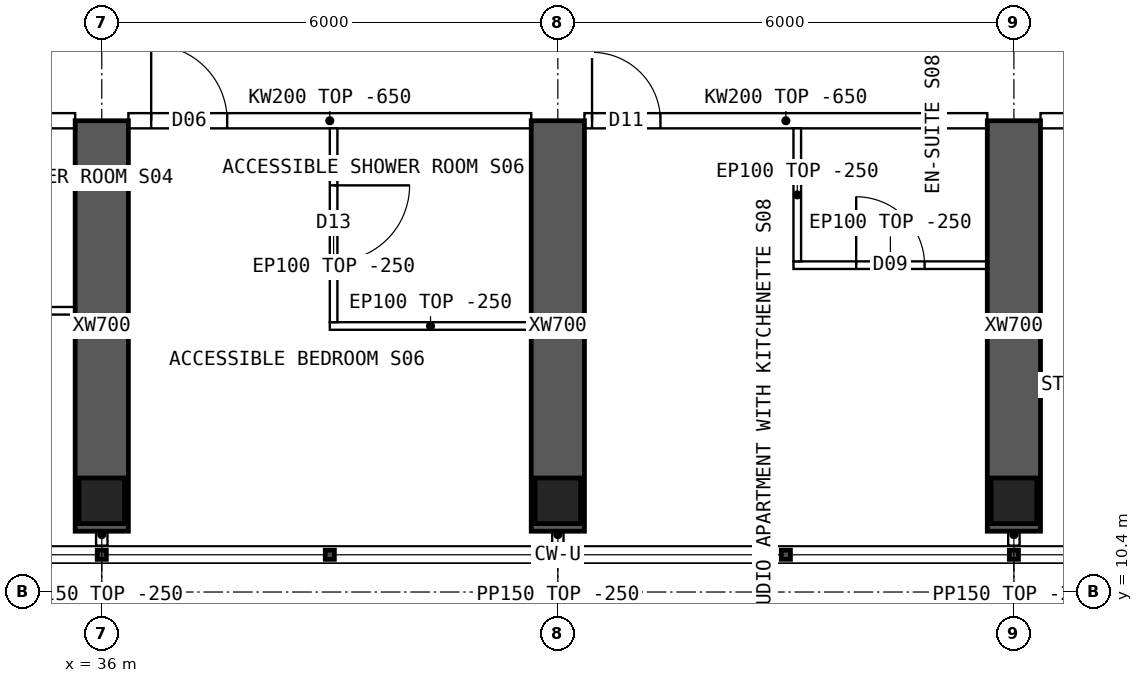
"""IFC4 building model, lengths in metres.
Left out: names, types, materials, properties, quantities, classifications, styles, units other than length and angle.
Written with IfcOpenShell. Run it as: python <this file> out.ifc"""

import sys

from ifc_helpers import new_model, si_unit, direction, frame, frame_2d, origin, origin_2d, place, context, subcontext, project, spatial, polyline, rectangle, hollow_rectangle, outline, extrude, element, fill, save


model = new_model("IFC4")
c1 = context("Model", 3, precision=1e-05, world=origin(), true_north=direction((0.0, 1.0)))
c2 = subcontext(c1, "Body", "Model", "MODEL_VIEW")
j1 = project(units=[si_unit("LENGTHUNIT", "METRE"), si_unit("PLANEANGLEUNIT", "RADIAN")], contexts=[c1])
p1 = place(None, origin())
s1 = spatial("IfcSite", under=j1, at=p1, CompositionType="ELEMENT")
p2 = place(p1, origin())
s2 = spatial("IfcBuilding", under=s1, at=p2, CompositionType="ELEMENT")
p3 = place(p2, frame((0.0, 0.0, 250.3)))
s3 = spatial("IfcBuildingStorey", under=s2, at=p3, CompositionType="ELEMENT", Elevation=250.3)
for number, where, z_axis, x_axis in (
    (1, (36.0, 11.6, 0.0), (0.0, 0.0, 1.0), (1.0, 0.0, 0.0)),
    (2, (42.0, 11.6, 0.0), (0.0, 0.0, 1.0), (1.0, 0.0, 0.0)),
    (3, (48.0, 11.6, 0.0), (0.0, 0.0, 1.0), (1.0, 0.0, 0.0)),
):
    element("IfcColumn", number, at=place(p3, frame(where, z_axis=z_axis, x_axis=x_axis)), inside=s3, PredefinedType="COLUMN", context=c2, shape_type="SweptSolid", body=[
        extrude(hollow_rectangle(XDim=0.6, YDim=0.6, WallThickness=0.06, at=origin_2d()), origin(), (0.0, 0.0, 1.0), 3.75),
    ])
for number, where, z_axis, x_axis in (
    (4, (36.0, 11.2, 0.0), (0.0, 0.0, 1.0), (0.0, 1.0, 0.0)),
    (5, (42.0, 11.2, 0.0), (0.0, 0.0, 1.0), (0.0, 1.0, 0.0)),
    (6, (48.0, 11.2, 0.0), (0.0, 0.0, 1.0), (0.0, 1.0, 0.0)),
):
    element("IfcWall", number, at=place(p3, frame(where, z_axis=z_axis, x_axis=x_axis)), inside=s3, PredefinedType="SHEAR", context=c2, shape_type="SweptSolid", body=[
        extrude(rectangle(XDim=5.4, YDim=0.7, at=frame_2d((2.7, 0.0))), origin(), (0.0, 0.0, 1.0), 3.75),
    ])
p4 = place(p3, frame((30.35, 16.6, 0.0), z_axis=(0.0, 0.0, 1.0), x_axis=(1.0, 0.0, 0.0)))
e7 = element("IfcWall", 7, at=p4, inside=s3, PredefinedType="SOLIDWALL", context=c2, shape_type="SweptSolid", body=[
    extrude(outline(polyline([(0.0, 0.0), (5.3, 0.0), (5.3, 3.1), (0.0, 3.1), (0.0, 0.0)])), frame((0.0, 0.1, 0.0), z_axis=(0.0, -1.0, 0.0), x_axis=(1.0, 0.0, 0.0)), (0.0, 0.0, 1.0), 0.2),
])
p5 = place(p4, frame((2.3, 0.0, 0.0)))
e8 = element("IfcOpeningElement", 8, at=p5, cuts=e7, PredefinedType="OPENING", context=c2, shape_type="SweptSolid", body=[
    extrude(rectangle(XDim=0.9, YDim=2.1, at=frame_2d((0.45, 1.05))), frame((0.0, 0.11, 0.0), z_axis=(0.0, -1.0, 0.0), x_axis=(1.0, 0.0, 0.0)), (0.0, 0.0, 1.0), 0.22),
])
p6 = place(p3, frame((36.35, 16.6, 0.0), z_axis=(0.0, 0.0, 1.0), x_axis=(1.0, 0.0, 0.0)))
e9 = element("IfcWall", 9, at=p6, inside=s3, PredefinedType="SOLIDWALL", context=c2, shape_type="SweptSolid", body=[
    extrude(outline(polyline([(0.0, 0.0), (5.3, 0.0), (5.3, 3.1), (0.0, 3.1), (0.0, 0.0)])), frame((0.0, 0.1, 0.0), z_axis=(0.0, -1.0, 0.0), x_axis=(1.0, 0.0, 0.0)), (0.0, 0.0, 1.0), 0.2),
])
p7 = place(p6, frame((0.3, 0.0, 0.0)))
e10 = element("IfcOpeningElement", 10, at=p7, cuts=e9, PredefinedType="OPENING", context=c2, shape_type="SweptSolid", body=[
    extrude(rectangle(XDim=1.0, YDim=2.1, at=frame_2d((0.5, 1.05))), frame((0.0, 0.11, 0.0), z_axis=(0.0, -1.0, 0.0), x_axis=(1.0, 0.0, 0.0)), (0.0, 0.0, 1.0), 0.22),
])
p8 = place(p3, frame((42.35, 16.6, 0.0), z_axis=(0.0, 0.0, 1.0), x_axis=(1.0, 0.0, 0.0)))
e11 = element("IfcWall", 11, at=p8, inside=s3, PredefinedType="SOLIDWALL", context=c2, shape_type="SweptSolid", body=[
    extrude(outline(polyline([(0.0, 0.0), (5.3, 0.0), (5.3, 3.1), (0.0, 3.1), (0.0, 0.0)])), frame((0.0, 0.1, 0.0), z_axis=(0.0, -1.0, 0.0), x_axis=(1.0, 0.0, 0.0)), (0.0, 0.0, 1.0), 0.2),
])
p9 = place(p8, frame((0.1, 0.0, 0.0)))
e12 = element("IfcOpeningElement", 12, at=p9, cuts=e11, PredefinedType="OPENING", context=c2, shape_type="SweptSolid", body=[
    extrude(rectangle(XDim=0.9, YDim=2.1, at=frame_2d((0.45, 1.05))), frame((0.0, 0.11, 0.0), z_axis=(0.0, -1.0, 0.0), x_axis=(1.0, 0.0, 0.0)), (0.0, 0.0, 1.0), 0.22),
])
p10 = place(p3, frame((48.35, 16.6, 0.0), z_axis=(0.0, 0.0, 1.0), x_axis=(1.0, 0.0, 0.0)))
e13 = element("IfcWall", 13, at=p10, inside=s3, PredefinedType="SOLIDWALL", context=c2, shape_type="SweptSolid", body=[
    extrude(outline(polyline([(0.0, 0.0), (5.3, 0.0), (5.3, 3.1), (0.0, 3.1), (0.0, 0.0)])), frame((0.0, 0.1, 0.0), z_axis=(0.0, -1.0, 0.0), x_axis=(1.0, 0.0, 0.0)), (0.0, 0.0, 1.0), 0.2),
])
p11 = place(p10, frame((2.3, 0.0, 0.0)))
e14 = element("IfcOpeningElement", 14, at=p11, cuts=e13, PredefinedType="OPENING", context=c2, shape_type="SweptSolid", body=[
    extrude(rectangle(XDim=0.9, YDim=2.1, at=frame_2d((0.45, 1.05))), frame((0.0, 0.11, 0.0), z_axis=(0.0, -1.0, 0.0), x_axis=(1.0, 0.0, 0.0)), (0.0, 0.0, 1.0), 0.22),
])
p12 = place(p3, frame((35.65, 14.1, 0.0), z_axis=(0.0, 0.0, 1.0), x_axis=(-1.0, 0.0, 0.0)))
e15 = element("IfcWall", 15, at=p12, inside=s3, PredefinedType="PARTITIONING", context=c2, shape_type="SweptSolid", body=[
    extrude(rectangle(XDim=3.15, YDim=0.1, at=frame_2d((1.575, 0.0))), origin(), (0.0, 0.0, 1.0), 3.5),
])
p13 = place(p12, frame((2.1, 0.0, 0.0)))
e16 = element("IfcOpeningElement", 16, at=p13, cuts=e15, PredefinedType="OPENING", context=c2, shape_type="SweptSolid", body=[
    extrude(rectangle(XDim=0.8, YDim=2.1, at=frame_2d((0.4, 1.05))), frame((0.0, 0.06, 0.0), z_axis=(0.0, -1.0, 0.0), x_axis=(1.0, 0.0, 0.0)), (0.0, 0.0, 1.0), 0.12),
])
p14 = place(p3, frame((39.0, 13.9, 0.0), z_axis=(0.0, 0.0, 1.0), x_axis=(1.0, 0.0, 0.0)))
e17 = element("IfcWall", 17, at=p14, inside=s3, PredefinedType="PARTITIONING", context=c2, shape_type="SweptSolid", body=[
    extrude(rectangle(XDim=2.65, YDim=0.1, at=frame_2d((1.325, 0.0))), origin(), (0.0, 0.0, 1.0), 3.5),
])
p15 = place(p3, frame((39.05, 13.95, 0.0), z_axis=(0.0, 0.0, 1.0), x_axis=(0.0, 1.0, 0.0)))
e18 = element("IfcWall", 18, at=p15, inside=s3, PredefinedType="PARTITIONING", context=c2, shape_type="SweptSolid", body=[
    extrude(outline(polyline([(0.0, 0.0), (2.55, 0.0), (2.55, 3.1), (2.502, 3.1), (2.5, 3.5), (0.0, 3.5), (0.0, 0.0)])), frame((0.0, 0.05, 0.0), z_axis=(0.0, -1.0, 0.0), x_axis=(1.0, 0.0, 0.0)), (0.0, 0.0, 1.0), 0.1),
])
p16 = place(p15, frame((0.8, 0.0, 0.0)))
e19 = element("IfcOpeningElement", 19, at=p16, cuts=e18, PredefinedType="OPENING", context=c2, shape_type="SweptSolid", body=[
    extrude(rectangle(XDim=1.0, YDim=2.1, at=frame_2d((0.5, 1.05))), frame((0.0, 0.06, 0.0), z_axis=(0.0, -1.0, 0.0), x_axis=(1.0, 0.0, 0.0)), (0.0, 0.0, 1.0), 0.12),
])
p17 = place(p3, frame((47.65, 14.7, 0.0), z_axis=(0.0, 0.0, 1.0), x_axis=(-1.0, 0.0, 0.0)))
e20 = element("IfcWall", 20, at=p17, inside=s3, PredefinedType="PARTITIONING", context=c2, shape_type="SweptSolid", body=[
    extrude(rectangle(XDim=2.55, YDim=0.1, at=frame_2d((1.275, 0.0))), origin(), (0.0, 0.0, 1.0), 3.5),
])
p18 = place(p17, frame((0.825, 0.0, 0.0)))
e21 = element("IfcOpeningElement", 21, at=p18, cuts=e20, PredefinedType="OPENING", context=c2, shape_type="SweptSolid", body=[
    extrude(rectangle(XDim=0.9, YDim=2.1, at=frame_2d((0.45, 1.05))), frame((0.0, 0.06, 0.0), z_axis=(0.0, -1.0, 0.0), x_axis=(1.0, 0.0, 0.0)), (0.0, 0.0, 1.0), 0.12),
])
p19 = place(p3, frame((45.15, 14.75, 0.0), z_axis=(0.0, 0.0, 1.0), x_axis=(0.0, 1.0, 0.0)))
e22 = element("IfcWall", 22, at=p19, inside=s3, PredefinedType="PARTITIONING", context=c2, shape_type="SweptSolid", body=[
    extrude(outline(polyline([(0.0, 0.0), (1.75, 0.0), (1.75, 3.1), (1.702, 3.1), (1.7, 3.5), (0.0, 3.5), (0.0, 0.0)])), frame((0.0, 0.05, 0.0), z_axis=(0.0, -1.0, 0.0), x_axis=(1.0, 0.0, 0.0)), (0.0, 0.0, 1.0), 0.1),
])
for number, where, z_axis, x_axis in (
    (23, (36.0, 11.3, 0.0), (0.0, 0.0, 1.0), (0.0, -1.0, 0.0)),
    (24, (42.0, 11.3, 0.0), (0.0, 0.0, 1.0), (0.0, -1.0, 0.0)),
    (25, (48.0, 11.3, 0.0), (0.0, 0.0, 1.0), (0.0, -1.0, 0.0)),
):
    element("IfcWall", number, at=place(p3, frame(where, z_axis=z_axis, x_axis=x_axis)), inside=s3, PredefinedType="PARTITIONING", context=c2, shape_type="SweptSolid", body=[
        extrude(rectangle(XDim=0.29, YDim=0.15, at=frame_2d((0.145, 0.0))), origin(), (0.0, 0.0, 1.0), 3.5),
    ])
p20 = place(p16, origin())
e26 = element("IfcDoor", 26, at=p20, inside=s3, OperationType="SINGLE_SWING_RIGHT", PredefinedType="DOOR", context=c2, shape_type="SweptSolid", body=[
    extrude(rectangle(XDim=1.0, YDim=2.1, at=frame_2d((0.5, 1.05))), frame((0.0, 0.025, 0.0), z_axis=(0.0, -1.0, 0.0), x_axis=(1.0, 0.0, 0.0)), (0.0, 0.0, 1.0), 0.05),
])
fill(e19, e26)
p21 = place(p7, origin())
e27 = element("IfcDoor", 27, at=p21, inside=s3, OperationType="SINGLE_SWING_LEFT", PredefinedType="DOOR", context=c2, shape_type="SweptSolid", body=[
    extrude(rectangle(XDim=1.0, YDim=2.1, at=frame_2d((0.5, 1.05))), frame((0.0, 0.025, 0.0), z_axis=(0.0, -1.0, 0.0), x_axis=(1.0, 0.0, 0.0)), (0.0, 0.0, 1.0), 0.05),
])
fill(e10, e27)
p22 = place(p18, origin())
e28 = element("IfcDoor", 28, at=p22, inside=s3, OperationType="SINGLE_SWING_RIGHT", PredefinedType="DOOR", context=c2, shape_type="SweptSolid", body=[
    extrude(rectangle(XDim=0.9, YDim=2.1, at=frame_2d((0.45, 1.05))), frame((0.0, 0.025, 0.0), z_axis=(0.0, -1.0, 0.0), x_axis=(1.0, 0.0, 0.0)), (0.0, 0.0, 1.0), 0.05),
])
fill(e21, e28)
p23 = place(p9, origin())
e29 = element("IfcDoor", 29, at=p23, inside=s3, OperationType="SINGLE_SWING_LEFT", PredefinedType="DOOR", context=c2, shape_type="SweptSolid", body=[
    extrude(rectangle(XDim=0.9, YDim=2.1, at=frame_2d((0.45, 1.05))), frame((0.0, 0.025, 0.0), z_axis=(0.0, -1.0, 0.0), x_axis=(1.0, 0.0, 0.0)), (0.0, 0.0, 1.0), 0.05),
])
fill(e12, e29)
save(model, sys.argv[1])
